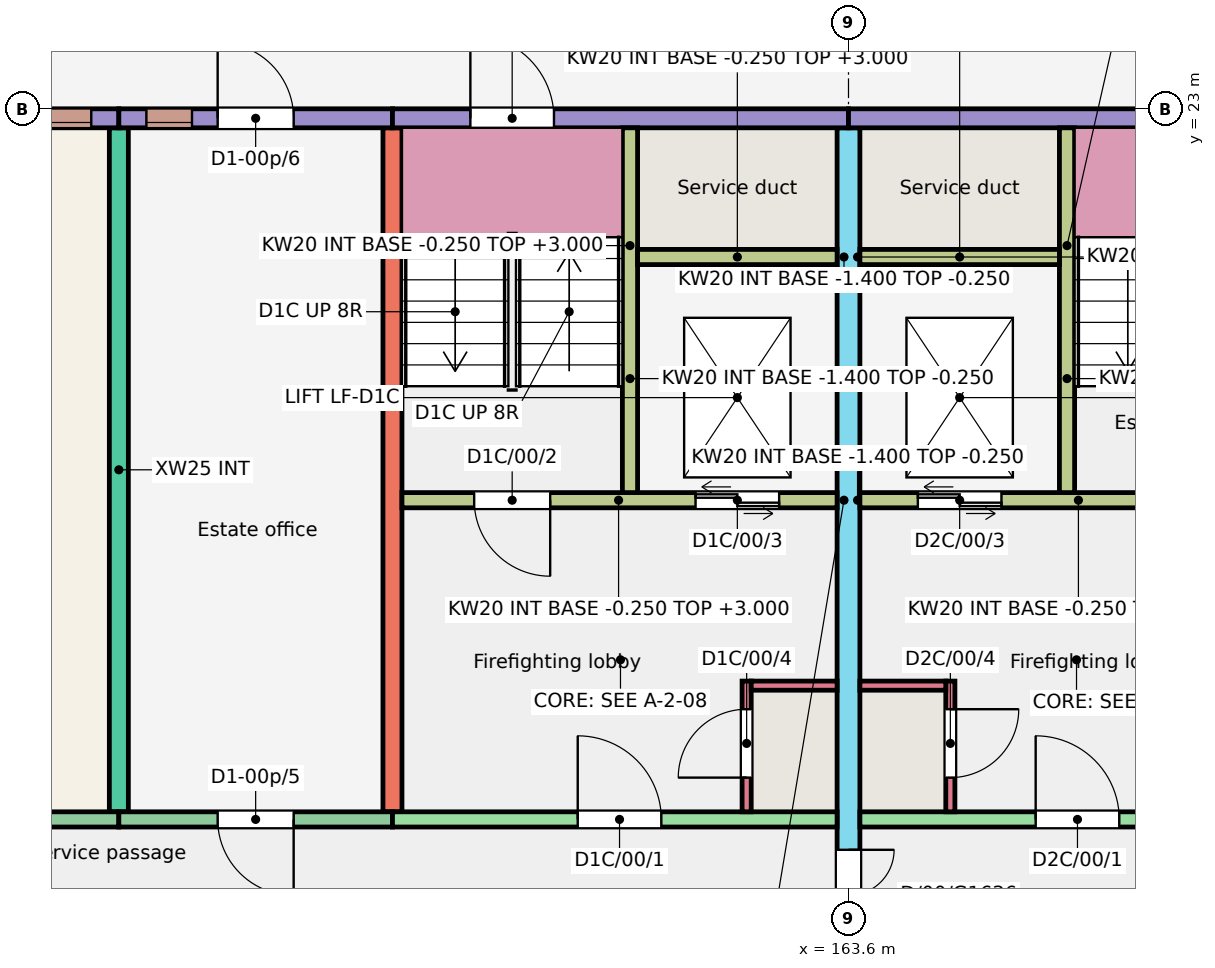
"""IFC4 building model, lengths in metres.
Left out: names, types, materials, properties, quantities, classifications, styles, units other than length and angle.
Written with IfcOpenShell. Run it as: python <this file> out.ifc"""

import sys

from ifc_helpers import new_model, si_unit, direction, frame, frame_2d, origin, place, context, subcontext, project, spatial, rectangle, extrude, element, fill, save


model = new_model("IFC4")
c1 = context("Model", 3, precision=1e-05, world=origin(), true_north=direction((0.0, 1.0)))
c2 = subcontext(c1, "Body", "Model", "MODEL_VIEW")
j1 = project(units=[si_unit("LENGTHUNIT", "METRE"), si_unit("PLANEANGLEUNIT", "RADIAN")], contexts=[c1])
p1 = place(None, origin())
s1 = spatial("IfcSite", under=j1, at=p1, CompositionType="ELEMENT")
p2 = place(p1, origin())
s2 = spatial("IfcBuilding", under=s1, at=p2, CompositionType="ELEMENT")
p3 = place(p2, origin())
s3 = spatial("IfcBuildingStorey", under=s2, at=p3, CompositionType="ELEMENT", Elevation=0.0)
for number, where, z_axis, x_axis in (
    (1, (154.0, 13.75, -0.25), (0.0, 0.0, 1.0), (0.0, 1.0, 0.0)),
    (2, (157.6, 13.75, -0.25), (0.0, 0.0, 1.0), (0.0, 1.0, 0.0)),
):
    element("IfcWall", number, at=place(p3, frame(where, z_axis=z_axis, x_axis=x_axis)), inside=s3, PredefinedType="SHEAR", context=c2, shape_type="SweptSolid", body=[
        extrude(rectangle(XDim=9.0, YDim=0.25, at=frame_2d((4.5, 0.0))), origin(), (0.0, 0.0, 1.0), 3.25),
    ])
p4 = place(p3, frame((163.6, 11.75, -0.25), z_axis=(0.0, 0.0, 1.0), x_axis=(0.0, 1.0, 0.0)))
e3 = element("IfcWall", 3, at=p4, inside=s3, PredefinedType="SHEAR", context=c2, shape_type="SweptSolid", body=[
    extrude(rectangle(XDim=11.0, YDim=0.3, at=frame_2d((5.5, 0.0))), origin(), (0.0, 0.0, 1.0), 3.25),
])
p5 = place(p4, frame((0.3, 0.0, 0.25)))
e4 = element("IfcOpeningElement", 4, at=p5, cuts=e3, PredefinedType="OPENING", context=c2, shape_type="SweptSolid", body=[
    extrude(rectangle(XDim=1.2, YDim=2.1, at=frame_2d((0.6, 1.05))), frame((0.0, 0.16, 0.0), z_axis=(0.0, -1.0, 0.0), x_axis=(1.0, 0.0, 0.0)), (0.0, 0.0, 1.0), 0.32),
])
p6 = place(p3, frame((150.4, 22.875, -0.25), z_axis=(0.0, 0.0, 1.0), x_axis=(1.0, 0.0, 0.0)))
e5 = element("IfcWall", 5, at=p6, inside=s3, PredefinedType="SOLIDWALL", context=c2, shape_type="SweptSolid", body=[
    extrude(rectangle(XDim=3.6, YDim=0.25, at=frame_2d((1.8, 0.0))), origin(), (0.0, 0.0, 1.0), 3.25),
])
p7 = place(p6, frame((2.637, 0.0, 2.05)))
e6 = element("IfcOpeningElement", 6, at=p7, cuts=e5, PredefinedType="OPENING", context=c2, shape_type="SweptSolid", body=[
    extrude(rectangle(XDim=0.6, YDim=0.6, at=frame_2d((0.3, 0.3))), frame((0.0, 0.135, 0.0), z_axis=(0.0, -1.0, 0.0), x_axis=(1.0, 0.0, 0.0)), (0.0, 0.0, 1.0), 0.27),
])
p8 = place(p6, frame((1.3, 0.0, 0.25)))
e7 = element("IfcOpeningElement", 7, at=p8, cuts=e5, PredefinedType="OPENING", context=c2, shape_type="SweptSolid", body=[
    extrude(rectangle(XDim=1.0, YDim=2.1, at=frame_2d((0.5, 1.05))), frame((0.0, 0.135, 0.0), z_axis=(0.0, -1.0, 0.0), x_axis=(1.0, 0.0, 0.0)), (0.0, 0.0, 1.0), 0.27),
])
p9 = place(p3, frame((150.4, 13.65, -0.25), z_axis=(0.0, 0.0, 1.0), x_axis=(1.0, 0.0, 0.0)))
e8 = element("IfcWall", 8, at=p9, inside=s3, PredefinedType="SOLIDWALL", context=c2, shape_type="SweptSolid", body=[
    extrude(rectangle(XDim=3.6, YDim=0.2, at=frame_2d((1.8, 0.0))), origin(), (0.0, 0.0, 1.0), 3.25),
])
p10 = place(p9, frame((1.3, 0.0, 0.25)))
e9 = element("IfcOpeningElement", 9, at=p10, cuts=e8, PredefinedType="OPENING", context=c2, shape_type="SweptSolid", body=[
    extrude(rectangle(XDim=1.0, YDim=2.1, at=frame_2d((0.5, 1.05))), frame((0.0, 0.11, 0.0), z_axis=(0.0, -1.0, 0.0), x_axis=(1.0, 0.0, 0.0)), (0.0, 0.0, 1.0), 0.22),
])
p11 = place(p3, frame((154.0, 22.875, -0.25), z_axis=(0.0, 0.0, 1.0), x_axis=(1.0, 0.0, 0.0)))
e10 = element("IfcWall", 10, at=p11, inside=s3, PredefinedType="SOLIDWALL", context=c2, shape_type="SweptSolid", body=[
    extrude(rectangle(XDim=3.6, YDim=0.25, at=frame_2d((1.8, 0.0))), origin(), (0.0, 0.0, 1.0), 3.25),
])
p12 = place(p11, frame((0.363, 0.0, 2.05)))
e11 = element("IfcOpeningElement", 11, at=p12, cuts=e10, PredefinedType="OPENING", context=c2, shape_type="SweptSolid", body=[
    extrude(rectangle(XDim=0.6, YDim=0.6, at=frame_2d((0.3, 0.3))), frame((0.0, 0.135, 0.0), z_axis=(0.0, -1.0, 0.0), x_axis=(1.0, 0.0, 0.0)), (0.0, 0.0, 1.0), 0.27),
])
p13 = place(p11, frame((1.3, 0.0, 0.25)))
e12 = element("IfcOpeningElement", 12, at=p13, cuts=e10, PredefinedType="OPENING", context=c2, shape_type="SweptSolid", body=[
    extrude(rectangle(XDim=1.0, YDim=2.1, at=frame_2d((0.5, 1.05))), frame((0.0, 0.135, 0.0), z_axis=(0.0, -1.0, 0.0), x_axis=(1.0, 0.0, 0.0)), (0.0, 0.0, 1.0), 0.27),
])
p14 = place(p3, frame((154.0, 13.65, -0.25), z_axis=(0.0, 0.0, 1.0), x_axis=(1.0, 0.0, 0.0)))
e13 = element("IfcWall", 13, at=p14, inside=s3, PredefinedType="SOLIDWALL", context=c2, shape_type="SweptSolid", body=[
    extrude(rectangle(XDim=3.6, YDim=0.2, at=frame_2d((1.8, 0.0))), origin(), (0.0, 0.0, 1.0), 3.25),
])
p15 = place(p14, frame((1.3, 0.0, 0.25)))
e14 = element("IfcOpeningElement", 14, at=p15, cuts=e13, PredefinedType="OPENING", context=c2, shape_type="SweptSolid", body=[
    extrude(rectangle(XDim=1.0, YDim=2.1, at=frame_2d((0.5, 1.05))), frame((0.0, 0.11, 0.0), z_axis=(0.0, -1.0, 0.0), x_axis=(1.0, 0.0, 0.0)), (0.0, 0.0, 1.0), 0.22),
])
p16 = place(p3, frame((157.6, 22.875, -0.25), z_axis=(0.0, 0.0, 1.0), x_axis=(1.0, 0.0, 0.0)))
e15 = element("IfcWall", 15, at=p16, inside=s3, PredefinedType="SOLIDWALL", context=c2, shape_type="SweptSolid", body=[
    extrude(rectangle(XDim=6.0, YDim=0.25, at=frame_2d((3.0, 0.0))), origin(), (0.0, 0.0, 1.0), 3.25),
])
p17 = place(p16, frame((1.025, 0.0, 0.25)))
e16 = element("IfcOpeningElement", 16, at=p17, cuts=e15, PredefinedType="OPENING", context=c2, shape_type="SweptSolid", body=[
    extrude(rectangle(XDim=1.1, YDim=2.1, at=frame_2d((0.55, 1.05))), frame((0.0, 0.135, 0.0), z_axis=(0.0, -1.0, 0.0), x_axis=(1.0, 0.0, 0.0)), (0.0, 0.0, 1.0), 0.27),
])
p18 = place(p3, frame((157.6, 13.65, -0.25), z_axis=(0.0, 0.0, 1.0), x_axis=(1.0, 0.0, 0.0)))
e17 = element("IfcWall", 17, at=p18, inside=s3, PredefinedType="SHEAR", context=c2, shape_type="SweptSolid", body=[
    extrude(rectangle(XDim=5.85, YDim=0.2, at=frame_2d((2.925, 0.0))), origin(), (0.0, 0.0, 1.0), 3.25),
])
p19 = place(p18, frame((2.438, 0.0, 0.25)))
e18 = element("IfcOpeningElement", 18, at=p19, cuts=e17, PredefinedType="OPENING", context=c2, shape_type="SweptSolid", body=[
    extrude(rectangle(XDim=1.1, YDim=2.1, at=frame_2d((0.55, 1.05))), frame((0.0, 0.11, 0.0), z_axis=(0.0, -1.0, 0.0), x_axis=(1.0, 0.0, 0.0)), (0.0, 0.0, 1.0), 0.22),
])
p20 = place(p3, frame((157.725, 17.85, -0.25), z_axis=(0.0, 0.0, 1.0), x_axis=(1.0, 0.0, 0.0)))
e19 = element("IfcWall", 19, at=p20, inside=s3, PredefinedType="SHEAR", context=c2, shape_type="SweptSolid", body=[
    extrude(rectangle(XDim=5.725, YDim=0.2, at=frame_2d((2.862, 0.0))), origin(), (0.0, 0.0, 1.0), 3.25),
])
p21 = place(p20, frame((0.95, 0.0, 0.25)))
e20 = element("IfcOpeningElement", 20, at=p21, cuts=e19, PredefinedType="OPENING", context=c2, shape_type="SweptSolid", body=[
    extrude(rectangle(XDim=1.0, YDim=2.1, at=frame_2d((0.5, 1.05))), frame((0.0, 0.11, 0.0), z_axis=(0.0, -1.0, 0.0), x_axis=(1.0, 0.0, 0.0)), (0.0, 0.0, 1.0), 0.22),
])
p22 = place(p20, frame((3.863, 0.0, 0.25)))
e21 = element("IfcOpeningElement", 21, at=p22, cuts=e19, PredefinedType="OPENING", context=c2, shape_type="SweptSolid", body=[
    extrude(rectangle(XDim=1.1, YDim=2.1, at=frame_2d((0.55, 1.05))), frame((0.0, 0.11, 0.0), z_axis=(0.0, -1.0, 0.0), x_axis=(1.0, 0.0, 0.0)), (0.0, 0.0, 1.0), 0.22),
])
p23 = place(p3, frame((160.725, 17.95, -0.25), z_axis=(0.0, 0.0, 1.0), x_axis=(0.0, 1.0, 0.0)))
e22 = element("IfcWall", 22, at=p23, inside=s3, PredefinedType="SHEAR", context=c2, shape_type="SweptSolid", body=[
    extrude(rectangle(XDim=4.8, YDim=0.2, at=frame_2d((2.4, 0.0))), origin(), (0.0, 0.0, 1.0), 3.25),
])
p24 = place(p3, frame((160.825, 21.05, -0.25), z_axis=(0.0, 0.0, 1.0), x_axis=(1.0, 0.0, 0.0)))
e23 = element("IfcWall", 23, at=p24, inside=s3, PredefinedType="SHEAR", context=c2, shape_type="SweptSolid", body=[
    extrude(rectangle(XDim=2.625, YDim=0.2, at=frame_2d((1.312, 0.0))), origin(), (0.0, 0.0, 1.0), 3.25),
])
p25 = place(p3, frame((162.26, 13.75, -0.25), z_axis=(0.0, 0.0, 1.0), x_axis=(0.0, 1.0, 0.0)))
e24 = element("IfcWall", 24, at=p25, inside=s3, PredefinedType="SHEAR", context=c2, shape_type="SweptSolid", body=[
    extrude(rectangle(XDim=1.72, YDim=0.12, at=frame_2d((0.86, 0.0))), origin(), (0.0, 0.0, 1.0), 3.25),
])
p26 = place(p25, frame((0.45, 0.0, 0.25)))
e25 = element("IfcOpeningElement", 25, at=p26, cuts=e24, PredefinedType="OPENING", context=c2, shape_type="SweptSolid", body=[
    extrude(rectangle(XDim=0.9, YDim=2.1, at=frame_2d((0.45, 1.05))), frame((0.0, 0.07, 0.0), z_axis=(0.0, -1.0, 0.0), x_axis=(1.0, 0.0, 0.0)), (0.0, 0.0, 1.0), 0.14),
])
p27 = place(p3, frame((162.32, 15.41, -0.25), z_axis=(0.0, 0.0, 1.0), x_axis=(1.0, 0.0, 0.0)))
e26 = element("IfcWall", 26, at=p27, inside=s3, PredefinedType="SHEAR", context=c2, shape_type="SweptSolid", body=[
    extrude(rectangle(XDim=1.13, YDim=0.12, at=frame_2d((0.565, 0.0))), origin(), (0.0, 0.0, 1.0), 3.25),
])
p28 = place(p3, frame((163.6, 22.875, -0.25), z_axis=(0.0, 0.0, 1.0), x_axis=(1.0, 0.0, 0.0)))
e27 = element("IfcWall", 27, at=p28, inside=s3, PredefinedType="SOLIDWALL", context=c2, shape_type="SweptSolid", body=[
    extrude(rectangle(XDim=6.0, YDim=0.25, at=frame_2d((3.0, 0.0))), origin(), (0.0, 0.0, 1.0), 3.25),
])
p29 = place(p28, frame((3.875, 0.0, 0.25)))
e28 = element("IfcOpeningElement", 28, at=p29, cuts=e27, PredefinedType="OPENING", context=c2, shape_type="SweptSolid", body=[
    extrude(rectangle(XDim=1.1, YDim=2.1, at=frame_2d((0.55, 1.05))), frame((0.0, 0.135, 0.0), z_axis=(0.0, -1.0, 0.0), x_axis=(1.0, 0.0, 0.0)), (0.0, 0.0, 1.0), 0.27),
])
p30 = place(p3, frame((163.75, 13.65, -0.25), z_axis=(0.0, 0.0, 1.0), x_axis=(1.0, 0.0, 0.0)))
e29 = element("IfcWall", 29, at=p30, inside=s3, PredefinedType="SHEAR", context=c2, shape_type="SweptSolid", body=[
    extrude(rectangle(XDim=5.85, YDim=0.2, at=frame_2d((2.925, 0.0))), origin(), (0.0, 0.0, 1.0), 3.25),
])
p31 = place(p30, frame((2.312, 0.0, 0.25)))
e30 = element("IfcOpeningElement", 30, at=p31, cuts=e29, PredefinedType="OPENING", context=c2, shape_type="SweptSolid", body=[
    extrude(rectangle(XDim=1.1, YDim=2.1, at=frame_2d((0.55, 1.05))), frame((0.0, 0.11, 0.0), z_axis=(0.0, -1.0, 0.0), x_axis=(1.0, 0.0, 0.0)), (0.0, 0.0, 1.0), 0.22),
])
p32 = place(p3, frame((163.75, 17.85, -0.25), z_axis=(0.0, 0.0, 1.0), x_axis=(1.0, 0.0, 0.0)))
e31 = element("IfcWall", 31, at=p32, inside=s3, PredefinedType="SHEAR", context=c2, shape_type="SweptSolid", body=[
    extrude(rectangle(XDim=5.725, YDim=0.2, at=frame_2d((2.863, 0.0))), origin(), (0.0, 0.0, 1.0), 3.25),
])
p33 = place(p32, frame((3.775, 0.0, 0.25)))
e32 = element("IfcOpeningElement", 32, at=p33, cuts=e31, PredefinedType="OPENING", context=c2, shape_type="SweptSolid", body=[
    extrude(rectangle(XDim=1.0, YDim=2.1, at=frame_2d((0.5, 1.05))), frame((0.0, 0.11, 0.0), z_axis=(0.0, -1.0, 0.0), x_axis=(1.0, 0.0, 0.0)), (0.0, 0.0, 1.0), 0.22),
])
p34 = place(p32, frame((0.762, 0.0, 0.25)))
e33 = element("IfcOpeningElement", 33, at=p34, cuts=e31, PredefinedType="OPENING", context=c2, shape_type="SweptSolid", body=[
    extrude(rectangle(XDim=1.1, YDim=2.1, at=frame_2d((0.55, 1.05))), frame((0.0, 0.11, 0.0), z_axis=(0.0, -1.0, 0.0), x_axis=(1.0, 0.0, 0.0)), (0.0, 0.0, 1.0), 0.22),
])
p35 = place(p3, frame((166.475, 17.95, -0.25), z_axis=(0.0, 0.0, 1.0), x_axis=(0.0, 1.0, 0.0)))
e34 = element("IfcWall", 34, at=p35, inside=s3, PredefinedType="SHEAR", context=c2, shape_type="SweptSolid", body=[
    extrude(rectangle(XDim=4.8, YDim=0.2, at=frame_2d((2.4, 0.0))), origin(), (0.0, 0.0, 1.0), 3.25),
])
p36 = place(p3, frame((163.75, 21.05, -0.25), z_axis=(0.0, 0.0, 1.0), x_axis=(1.0, 0.0, 0.0)))
e35 = element("IfcWall", 35, at=p36, inside=s3, PredefinedType="SHEAR", context=c2, shape_type="SweptSolid", body=[
    extrude(rectangle(XDim=2.625, YDim=0.2, at=frame_2d((1.312, 0.0))), origin(), (0.0, 0.0, 1.0), 3.25),
])
p37 = place(p3, frame((164.94, 13.75, -0.25), z_axis=(0.0, 0.0, 1.0), x_axis=(0.0, 1.0, 0.0)))
e36 = element("IfcWall", 36, at=p37, inside=s3, PredefinedType="SHEAR", context=c2, shape_type="SweptSolid", body=[
    extrude(rectangle(XDim=1.72, YDim=0.12, at=frame_2d((0.86, 0.0))), origin(), (0.0, 0.0, 1.0), 3.25),
])
p38 = place(p37, frame((0.45, 0.0, 0.25)))
e37 = element("IfcOpeningElement", 37, at=p38, cuts=e36, PredefinedType="OPENING", context=c2, shape_type="SweptSolid", body=[
    extrude(rectangle(XDim=0.9, YDim=2.1, at=frame_2d((0.45, 1.05))), frame((0.0, 0.07, 0.0), z_axis=(0.0, -1.0, 0.0), x_axis=(1.0, 0.0, 0.0)), (0.0, 0.0, 1.0), 0.14),
])
p39 = place(p3, frame((163.75, 15.41, -0.25), z_axis=(0.0, 0.0, 1.0), x_axis=(1.0, 0.0, 0.0)))
e38 = element("IfcWall", 38, at=p39, inside=s3, PredefinedType="SHEAR", context=c2, shape_type="SweptSolid", body=[
    extrude(rectangle(XDim=1.13, YDim=0.12, at=frame_2d((0.565, 0.0))), origin(), (0.0, 0.0, 1.0), 3.25),
])
for number, where, z_axis, x_axis in (
    (39, (160.625, 17.85, -1.4), (0.0, 0.0, 1.0), (1.0, 0.0, 0.0)),
    (40, (160.625, 21.05, -1.4), (0.0, 0.0, 1.0), (1.0, 0.0, 0.0)),
):
    element("IfcWall", number, at=place(p3, frame(where, z_axis=z_axis, x_axis=x_axis)), inside=s3, PredefinedType="SHEAR", context=c2, shape_type="SweptSolid", body=[
        extrude(rectangle(XDim=2.975, YDim=0.2, at=frame_2d((1.488, 0.0))), origin(), (0.0, 0.0, 1.0), 1.15),
    ])
p40 = place(p3, frame((160.725, 17.95, -1.4), z_axis=(0.0, 0.0, 1.0), x_axis=(0.0, 1.0, 0.0)))
e41 = element("IfcWall", 41, at=p40, inside=s3, PredefinedType="SHEAR", context=c2, shape_type="SweptSolid", body=[
    extrude(rectangle(XDim=3.0, YDim=0.2, at=frame_2d((1.5, 0.0))), origin(), (0.0, 0.0, 1.0), 1.15),
])
p41 = place(p3, frame((163.525, 17.95, -1.4), z_axis=(0.0, 0.0, 1.0), x_axis=(0.0, 1.0, 0.0)))
e42 = element("IfcWall", 42, at=p41, inside=s3, PredefinedType="SHEAR", context=c2, shape_type="SweptSolid", body=[
    extrude(rectangle(XDim=3.0, YDim=0.15, at=frame_2d((1.5, 0.0))), origin(), (0.0, 0.0, 1.0), 1.15),
])
for number, where, z_axis, x_axis in (
    (43, (163.6, 17.85, -1.4), (0.0, 0.0, 1.0), (1.0, 0.0, 0.0)),
    (44, (163.6, 21.05, -1.4), (0.0, 0.0, 1.0), (1.0, 0.0, 0.0)),
):
    element("IfcWall", number, at=place(p3, frame(where, z_axis=z_axis, x_axis=x_axis)), inside=s3, PredefinedType="SHEAR", context=c2, shape_type="SweptSolid", body=[
        extrude(rectangle(XDim=2.975, YDim=0.2, at=frame_2d((1.487, 0.0))), origin(), (0.0, 0.0, 1.0), 1.15),
    ])
p42 = place(p3, frame((166.475, 17.95, -1.4), z_axis=(0.0, 0.0, 1.0), x_axis=(0.0, 1.0, 0.0)))
e45 = element("IfcWall", 45, at=p42, inside=s3, PredefinedType="SHEAR", context=c2, shape_type="SweptSolid", body=[
    extrude(rectangle(XDim=3.0, YDim=0.2, at=frame_2d((1.5, 0.0))), origin(), (0.0, 0.0, 1.0), 1.15),
])
p43 = place(p3, frame((163.675, 17.95, -1.4), z_axis=(0.0, 0.0, 1.0), x_axis=(0.0, 1.0, 0.0)))
e46 = element("IfcWall", 46, at=p43, inside=s3, PredefinedType="SHEAR", context=c2, shape_type="SweptSolid", body=[
    extrude(rectangle(XDim=3.0, YDim=0.15, at=frame_2d((1.5, 0.0))), origin(), (0.0, 0.0, 1.0), 1.15),
])
p44 = place(p7, origin())
e47 = element("IfcWindow", 47, at=p44, inside=s3, PartitioningType="SINGLE_PANEL", PredefinedType="WINDOW", context=c2, shape_type="SweptSolid", body=[
    extrude(rectangle(XDim=0.6, YDim=0.6, at=frame_2d((0.3, 0.3))), frame((0.0, -0.025, 0.0), z_axis=(0.0, -1.0, 0.0), x_axis=(1.0, 0.0, 0.0)), (0.0, 0.0, 1.0), 0.06),
])
fill(e6, e47)
p45 = place(p12, origin())
e48 = element("IfcWindow", 48, at=p45, inside=s3, PartitioningType="SINGLE_PANEL", PredefinedType="WINDOW", context=c2, shape_type="SweptSolid", body=[
    extrude(rectangle(XDim=0.6, YDim=0.6, at=frame_2d((0.3, 0.3))), frame((0.0, -0.025, 0.0), z_axis=(0.0, -1.0, 0.0), x_axis=(1.0, 0.0, 0.0)), (0.0, 0.0, 1.0), 0.06),
])
fill(e11, e48)
p46 = place(p15, origin())
e49 = element("IfcDoor", 49, at=p46, inside=s3, OperationType="SINGLE_SWING_RIGHT", PredefinedType="DOOR", context=c2, shape_type="SweptSolid", body=[
    extrude(rectangle(XDim=1.0, YDim=2.1, at=frame_2d((0.5, 1.05))), frame((0.0, 0.025, 0.0), z_axis=(0.0, -1.0, 0.0), x_axis=(1.0, 0.0, 0.0)), (0.0, 0.0, 1.0), 0.05),
])
fill(e14, e49)
p47 = place(p13, origin())
e50 = element("IfcDoor", 50, at=p47, inside=s3, OperationType="SINGLE_SWING_LEFT", PredefinedType="DOOR", context=c2, shape_type="SweptSolid", body=[
    extrude(rectangle(XDim=1.0, YDim=2.1, at=frame_2d((0.5, 1.05))), frame((0.0, 0.025, 0.0), z_axis=(0.0, -1.0, 0.0), x_axis=(1.0, 0.0, 0.0)), (0.0, 0.0, 1.0), 0.05),
])
fill(e12, e50)
p48 = place(p19, origin())
e51 = element("IfcDoor", 51, at=p48, inside=s3, OperationType="SINGLE_SWING_LEFT", PredefinedType="DOOR", context=c2, shape_type="SweptSolid", body=[
    extrude(rectangle(XDim=1.1, YDim=2.1, at=frame_2d((0.55, 1.05))), frame((0.0, 0.025, 0.0), z_axis=(0.0, -1.0, 0.0), x_axis=(1.0, 0.0, 0.0)), (0.0, 0.0, 1.0), 0.05),
])
fill(e18, e51)
p49 = place(p21, origin())
e52 = element("IfcDoor", 52, at=p49, inside=s3, OperationType="SINGLE_SWING_RIGHT", PredefinedType="DOOR", context=c2, shape_type="SweptSolid", body=[
    extrude(rectangle(XDim=1.0, YDim=2.1, at=frame_2d((0.5, 1.05))), frame((0.0, 0.025, 0.0), z_axis=(0.0, -1.0, 0.0), x_axis=(1.0, 0.0, 0.0)), (0.0, 0.0, 1.0), 0.05),
])
fill(e20, e52)
p50 = place(p22, origin())
e53 = element("IfcDoor", 53, at=p50, inside=s3, OperationType="DOUBLE_DOOR_SLIDING", PredefinedType="DOOR", context=c2, shape_type="SweptSolid", body=[
    extrude(rectangle(XDim=1.1, YDim=2.1, at=frame_2d((0.55, 1.05))), frame((0.0, 0.025, 0.0), z_axis=(0.0, -1.0, 0.0), x_axis=(1.0, 0.0, 0.0)), (0.0, 0.0, 1.0), 0.05),
])
fill(e21, e53)
p51 = place(p26, origin())
e54 = element("IfcDoor", 54, at=p51, inside=s3, OperationType="SINGLE_SWING_LEFT", PredefinedType="DOOR", context=c2, shape_type="SweptSolid", body=[
    extrude(rectangle(XDim=0.9, YDim=2.1, at=frame_2d((0.45, 1.05))), frame((0.0, 0.025, 0.0), z_axis=(0.0, -1.0, 0.0), x_axis=(1.0, 0.0, 0.0)), (0.0, 0.0, 1.0), 0.05),
])
fill(e25, e54)
p52 = place(p17, origin())
e55 = element("IfcDoor", 55, at=p52, inside=s3, OperationType="SINGLE_SWING_LEFT", PredefinedType="DOOR", context=c2, shape_type="SweptSolid", body=[
    extrude(rectangle(XDim=1.1, YDim=2.1, at=frame_2d((0.55, 1.05))), frame((0.0, 0.025, 0.0), z_axis=(0.0, -1.0, 0.0), x_axis=(1.0, 0.0, 0.0)), (0.0, 0.0, 1.0), 0.05),
])
fill(e16, e55)
p53 = place(p31, origin())
e56 = element("IfcDoor", 56, at=p53, inside=s3, OperationType="SINGLE_SWING_LEFT", PredefinedType="DOOR", context=c2, shape_type="SweptSolid", body=[
    extrude(rectangle(XDim=1.1, YDim=2.1, at=frame_2d((0.55, 1.05))), frame((0.0, 0.025, 0.0), z_axis=(0.0, -1.0, 0.0), x_axis=(1.0, 0.0, 0.0)), (0.0, 0.0, 1.0), 0.05),
])
fill(e30, e56)
p54 = place(p34, origin())
e57 = element("IfcDoor", 57, at=p54, inside=s3, OperationType="DOUBLE_DOOR_SLIDING", PredefinedType="DOOR", context=c2, shape_type="SweptSolid", body=[
    extrude(rectangle(XDim=1.1, YDim=2.1, at=frame_2d((0.55, 1.05))), frame((0.0, 0.025, 0.0), z_axis=(0.0, -1.0, 0.0), x_axis=(1.0, 0.0, 0.0)), (0.0, 0.0, 1.0), 0.05),
])
fill(e33, e57)
p55 = place(p38, origin())
e58 = element("IfcDoor", 58, at=p55, inside=s3, OperationType="SINGLE_SWING_RIGHT", PredefinedType="DOOR", context=c2, shape_type="SweptSolid", body=[
    extrude(rectangle(XDim=0.9, YDim=2.1, at=frame_2d((0.45, 1.05))), frame((0.0, 0.025, 0.0), z_axis=(0.0, -1.0, 0.0), x_axis=(1.0, 0.0, 0.0)), (0.0, 0.0, 1.0), 0.05),
])
fill(e37, e58)
p56 = place(p5, origin())
e59 = element("IfcDoor", 59, at=p56, inside=s3, OperationType="DOUBLE_DOOR_SINGLE_SWING", PredefinedType="DOOR", context=c2, shape_type="SweptSolid", body=[
    extrude(rectangle(XDim=1.2, YDim=2.1, at=frame_2d((0.6, 1.05))), frame((0.0, 0.025, 0.0), z_axis=(0.0, -1.0, 0.0), x_axis=(1.0, 0.0, 0.0)), (0.0, 0.0, 1.0), 0.05),
])
fill(e4, e59)
save(model, sys.argv[1])
